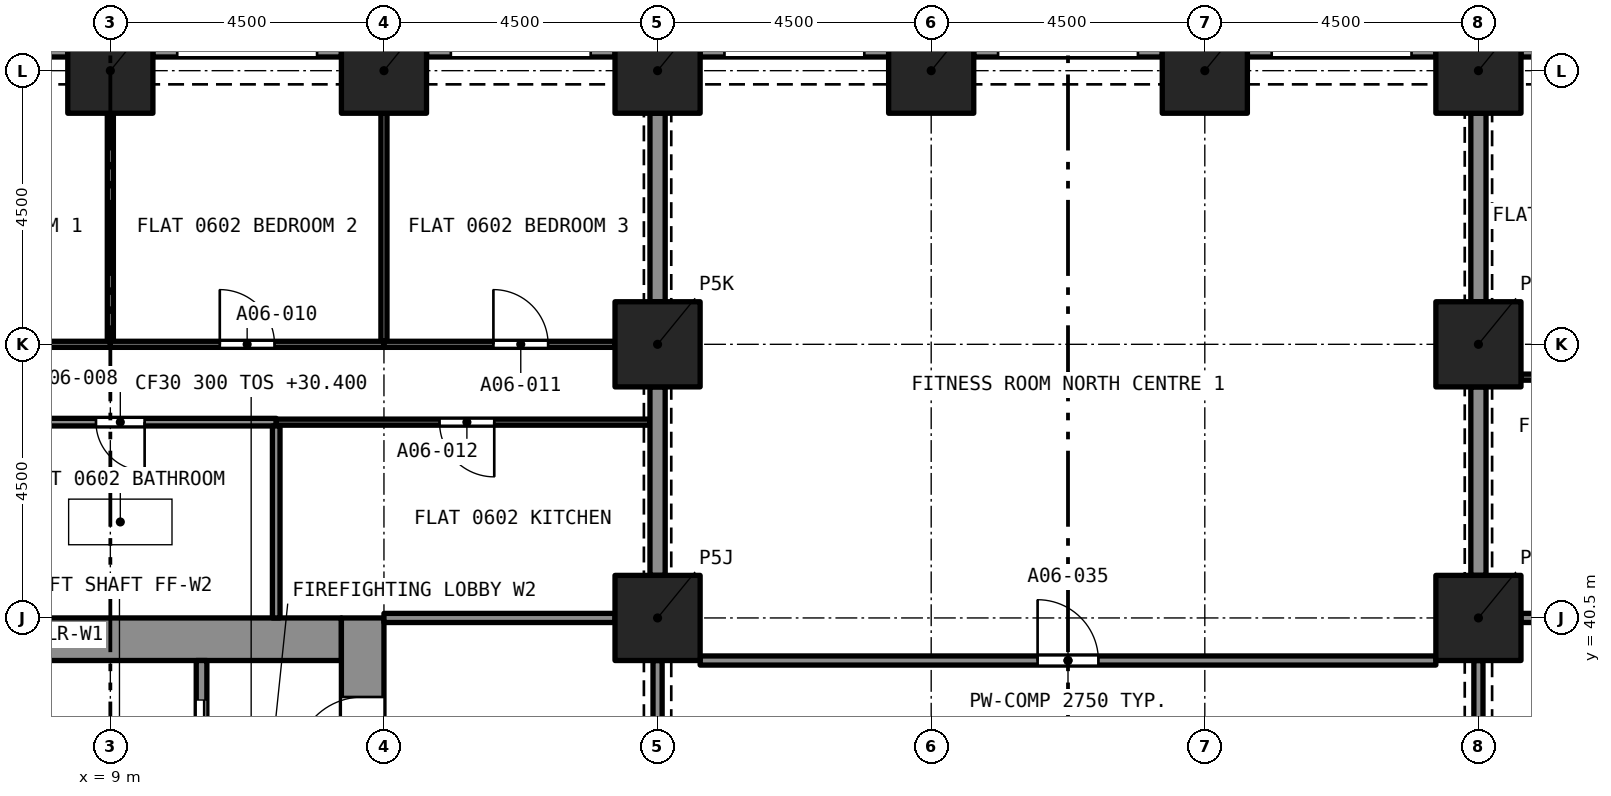
"""IFC4 building model, lengths in metres.
Left out: names, types, materials, properties, quantities, classifications, styles, units other than length and angle.
Written with IfcOpenShell. Run it as: python <this file> out.ifc"""

import sys

from ifc_helpers import new_model, si_unit, direction, frame, frame_2d, origin, origin_2d, place, context, subcontext, project, spatial, rectangle, extrude, element, fill, save


model = new_model("IFC4")
c1 = context("Model", 3, precision=1e-05, world=origin(), true_north=direction((0.0, 1.0)))
c2 = subcontext(c1, "Body", "Model", "MODEL_VIEW")
j1 = project(units=[si_unit("LENGTHUNIT", "METRE"), si_unit("PLANEANGLEUNIT", "RADIAN")], contexts=[c1])
p1 = place(None, origin())
s1 = spatial("IfcSite", under=j1, at=p1, CompositionType="ELEMENT")
p2 = place(p1, origin())
s2 = spatial("IfcBuilding", under=s1, at=p2, CompositionType="ELEMENT")
p3 = place(p2, frame((0.0, 0.0, 30.4)))
s3 = spatial("IfcBuildingStorey", under=s2, at=p3, CompositionType="ELEMENT", Elevation=30.4)
for number, where, z_axis, x_axis in (
    (1, (18.0, 40.5, 0.0), (0.0, 0.0, 1.0), (1.0, 0.0, 0.0)),
    (2, (31.5, 40.5, 0.0), (0.0, 0.0, 1.0), (1.0, 0.0, 0.0)),
    (3, (18.0, 45.0, 0.0), (0.0, 0.0, 1.0), (1.0, 0.0, 0.0)),
    (4, (31.5, 45.0, 0.0), (0.0, 0.0, 1.0), (1.0, 0.0, 0.0)),
    (5, (9.0, 49.5, 0.0), (0.0, 0.0, 1.0), (1.0, 0.0, 0.0)),
    (6, (13.5, 49.5, 0.0), (0.0, 0.0, 1.0), (1.0, 0.0, 0.0)),
    (7, (18.0, 49.5, 0.0), (0.0, 0.0, 1.0), (1.0, 0.0, 0.0)),
    (8, (22.5, 49.5, 0.0), (0.0, 0.0, 1.0), (1.0, 0.0, 0.0)),
    (9, (27.0, 49.5, 0.0), (0.0, 0.0, 1.0), (1.0, 0.0, 0.0)),
    (10, (31.5, 49.5, 0.0), (0.0, 0.0, 1.0), (1.0, 0.0, 0.0)),
):
    element("IfcColumn", number, at=place(p3, frame(where, z_axis=z_axis, x_axis=x_axis)), inside=s3, PredefinedType="COLUMN", context=c2, shape_type="SweptSolid", body=[
        extrude(rectangle(XDim=1.4, YDim=1.4, at=origin_2d()), origin(), (0.0, 0.0, 1.0), 3.2),
    ])
p4 = place(p3, frame((5.2, 40.15, 0.0), z_axis=(0.0, 0.0, 1.0), x_axis=(1.0, 0.0, 0.0)))
e11 = element("IfcWall", 11, at=p4, inside=s3, PredefinedType="SOLIDWALL", context=c2, shape_type="SweptSolid", body=[
    extrude(rectangle(XDim=7.6, YDim=0.7, at=frame_2d((3.8, 0.0))), origin(), (0.0, 0.0, 1.0), 3.2),
])
p5 = place(p3, frame((13.15, 27.0, 0.0), z_axis=(0.0, 0.0, 1.0), x_axis=(0.0, 1.0, 0.0)))
e12 = element("IfcWall", 12, at=p5, inside=s3, PredefinedType="SOLIDWALL", context=c2, shape_type="SweptSolid", body=[
    extrude(rectangle(XDim=13.5, YDim=0.7, at=frame_2d((6.75, 0.0))), origin(), (0.0, 0.0, 1.0), 3.2),
])
p6 = place(p5, frame((11.1, 0.0, 0.0)))
e13 = element("IfcOpeningElement", 13, at=p6, cuts=e12, PredefinedType="OPENING", context=c2, shape_type="SweptSolid", body=[
    extrude(rectangle(XDim=1.1, YDim=2.1, at=frame_2d((0.55, 1.05))), frame((0.0, 0.36, 0.0), z_axis=(0.0, -1.0, 0.0), x_axis=(1.0, 0.0, 0.0)), (0.0, 0.0, 1.0), 0.72),
])
p7 = place(p5, frame((8.95, 0.0, 0.0)))
e14 = element("IfcOpeningElement", 14, at=p7, cuts=e12, PredefinedType="OPENING", context=c2, shape_type="SweptSolid", body=[
    extrude(rectangle(XDim=1.2, YDim=2.1, at=frame_2d((0.6, 1.05))), frame((0.0, 0.36, 0.0), z_axis=(0.0, -1.0, 0.0), x_axis=(1.0, 0.0, 0.0)), (0.0, 0.0, 1.0), 0.72),
])
p8 = place(p3, frame((32.2, 49.875, 0.0), z_axis=(0.0, 0.0, 1.0), x_axis=(1.0, 0.0, 0.0)))
e15 = element("IfcWall", 15, at=p8, inside=s3, PredefinedType="SOLIDWALL", context=c2, shape_type="SweptSolid", body=[
    extrude(rectangle(XDim=3.1, YDim=0.3, at=frame_2d((1.55, 0.0))), origin(), (0.0, 0.0, 1.0), 3.2),
])
p9 = place(p8, frame((0.4, 0.0, 0.45)))
e16 = element("IfcOpeningElement", 16, at=p9, cuts=e15, PredefinedType="OPENING", context=c2, shape_type="SweptSolid", body=[
    extrude(rectangle(XDim=2.3, YDim=1.95, at=frame_2d((1.15, 0.975))), frame((0.0, 0.16, 0.0), z_axis=(0.0, -1.0, 0.0), x_axis=(1.0, 0.0, 0.0)), (0.0, 0.0, 1.0), 0.32),
])
p10 = place(p3, frame((27.7, 49.875, 0.0), z_axis=(0.0, 0.0, 1.0), x_axis=(1.0, 0.0, 0.0)))
e17 = element("IfcWall", 17, at=p10, inside=s3, PredefinedType="SOLIDWALL", context=c2, shape_type="SweptSolid", body=[
    extrude(rectangle(XDim=3.1, YDim=0.3, at=frame_2d((1.55, 0.0))), origin(), (0.0, 0.0, 1.0), 3.2),
])
p11 = place(p10, frame((0.4, 0.0, 0.45)))
e18 = element("IfcOpeningElement", 18, at=p11, cuts=e17, PredefinedType="OPENING", context=c2, shape_type="SweptSolid", body=[
    extrude(rectangle(XDim=2.3, YDim=1.95, at=frame_2d((1.15, 0.975))), frame((0.0, 0.16, 0.0), z_axis=(0.0, -1.0, 0.0), x_axis=(1.0, 0.0, 0.0)), (0.0, 0.0, 1.0), 0.32),
])
p12 = place(p3, frame((23.2, 49.875, 0.0), z_axis=(0.0, 0.0, 1.0), x_axis=(1.0, 0.0, 0.0)))
e19 = element("IfcWall", 19, at=p12, inside=s3, PredefinedType="SOLIDWALL", context=c2, shape_type="SweptSolid", body=[
    extrude(rectangle(XDim=3.1, YDim=0.3, at=frame_2d((1.55, 0.0))), origin(), (0.0, 0.0, 1.0), 3.2),
])
p13 = place(p12, frame((0.4, 0.0, 0.45)))
e20 = element("IfcOpeningElement", 20, at=p13, cuts=e19, PredefinedType="OPENING", context=c2, shape_type="SweptSolid", body=[
    extrude(rectangle(XDim=2.3, YDim=1.95, at=frame_2d((1.15, 0.975))), frame((0.0, 0.16, 0.0), z_axis=(0.0, -1.0, 0.0), x_axis=(1.0, 0.0, 0.0)), (0.0, 0.0, 1.0), 0.32),
])
p14 = place(p3, frame((18.7, 49.875, 0.0), z_axis=(0.0, 0.0, 1.0), x_axis=(1.0, 0.0, 0.0)))
e21 = element("IfcWall", 21, at=p14, inside=s3, PredefinedType="SOLIDWALL", context=c2, shape_type="SweptSolid", body=[
    extrude(rectangle(XDim=3.1, YDim=0.3, at=frame_2d((1.55, 0.0))), origin(), (0.0, 0.0, 1.0), 3.2),
])
p15 = place(p14, frame((0.4, 0.0, 0.45)))
e22 = element("IfcOpeningElement", 22, at=p15, cuts=e21, PredefinedType="OPENING", context=c2, shape_type="SweptSolid", body=[
    extrude(rectangle(XDim=2.3, YDim=1.95, at=frame_2d((1.15, 0.975))), frame((0.0, 0.16, 0.0), z_axis=(0.0, -1.0, 0.0), x_axis=(1.0, 0.0, 0.0)), (0.0, 0.0, 1.0), 0.32),
])
p16 = place(p3, frame((14.2, 49.875, 0.0), z_axis=(0.0, 0.0, 1.0), x_axis=(1.0, 0.0, 0.0)))
e23 = element("IfcWall", 23, at=p16, inside=s3, PredefinedType="SOLIDWALL", context=c2, shape_type="SweptSolid", body=[
    extrude(rectangle(XDim=3.1, YDim=0.3, at=frame_2d((1.55, 0.0))), origin(), (0.0, 0.0, 1.0), 3.2),
])
p17 = place(p16, frame((0.4, 0.0, 0.45)))
e24 = element("IfcOpeningElement", 24, at=p17, cuts=e23, PredefinedType="OPENING", context=c2, shape_type="SweptSolid", body=[
    extrude(rectangle(XDim=2.3, YDim=1.95, at=frame_2d((1.15, 0.975))), frame((0.0, 0.16, 0.0), z_axis=(0.0, -1.0, 0.0), x_axis=(1.0, 0.0, 0.0)), (0.0, 0.0, 1.0), 0.32),
])
p18 = place(p3, frame((9.7, 49.875, 0.0), z_axis=(0.0, 0.0, 1.0), x_axis=(1.0, 0.0, 0.0)))
e25 = element("IfcWall", 25, at=p18, inside=s3, PredefinedType="SOLIDWALL", context=c2, shape_type="SweptSolid", body=[
    extrude(rectangle(XDim=3.1, YDim=0.3, at=frame_2d((1.55, 0.0))), origin(), (0.0, 0.0, 1.0), 3.2),
])
p19 = place(p18, frame((0.4, 0.0, 0.45)))
e26 = element("IfcOpeningElement", 26, at=p19, cuts=e25, PredefinedType="OPENING", context=c2, shape_type="SweptSolid", body=[
    extrude(rectangle(XDim=2.3, YDim=1.95, at=frame_2d((1.15, 0.975))), frame((0.0, 0.16, 0.0), z_axis=(0.0, -1.0, 0.0), x_axis=(1.0, 0.0, 0.0)), (0.0, 0.0, 1.0), 0.32),
])
p20 = place(p3, frame((5.2, 49.875, 0.0), z_axis=(0.0, 0.0, 1.0), x_axis=(1.0, 0.0, 0.0)))
e27 = element("IfcWall", 27, at=p20, inside=s3, PredefinedType="SOLIDWALL", context=c2, shape_type="SweptSolid", body=[
    extrude(rectangle(XDim=3.1, YDim=0.3, at=frame_2d((1.55, 0.0))), origin(), (0.0, 0.0, 1.0), 3.2),
])
p21 = place(p20, frame((0.4, 0.0, 0.45)))
e28 = element("IfcOpeningElement", 28, at=p21, cuts=e27, PredefinedType="OPENING", context=c2, shape_type="SweptSolid", body=[
    extrude(rectangle(XDim=2.3, YDim=1.95, at=frame_2d((1.15, 0.975))), frame((0.0, 0.16, 0.0), z_axis=(0.0, -1.0, 0.0), x_axis=(1.0, 0.0, 0.0)), (0.0, 0.0, 1.0), 0.32),
])
p22 = place(p3, frame((11.728, 43.72, 0.0), z_axis=(0.0, 0.0, 1.0), x_axis=(-1.0, 0.0, 0.0)))
e29 = element("IfcWall", 29, at=p22, inside=s3, PredefinedType="PARTITIONING", context=c2, shape_type="SweptSolid", body=[
    extrude(rectangle(XDim=5.19, YDim=0.125, at=frame_2d((2.595, 0.0))), origin(), (0.0, 0.0, 1.0), 2.9),
])
p23 = place(p22, frame((2.164, 0.0, 0.0)))
e30 = element("IfcOpeningElement", 30, at=p23, cuts=e29, PredefinedType="OPENING", context=c2, shape_type="SweptSolid", body=[
    extrude(rectangle(XDim=0.8, YDim=2.1, at=frame_2d((0.4, 1.05))), frame((0.0, 0.073, 0.0), z_axis=(0.0, -1.0, 0.0), x_axis=(1.0, 0.0, 0.0)), (0.0, 0.0, 1.0), 0.145),
])
p24 = place(p3, frame((11.728, 40.5, 0.0), z_axis=(0.0, 0.0, 1.0), x_axis=(0.0, 1.0, 0.0)))
e31 = element("IfcWall", 31, at=p24, inside=s3, PredefinedType="PARTITIONING", context=c2, shape_type="SweptSolid", body=[
    extrude(rectangle(XDim=3.157, YDim=0.125, at=frame_2d((1.579, 0.0))), origin(), (0.0, 0.0, 1.0), 2.9),
])
p25 = place(p3, frame((9.0, 45.05, 0.0), z_axis=(0.0, 0.0, 1.0), x_axis=(0.0, 1.0, 0.0)))
e32 = element("IfcWall", 32, at=p25, inside=s3, PredefinedType="PARTITIONING", context=c2, shape_type="SweptSolid", body=[
    extrude(rectangle(XDim=3.75, YDim=0.1, at=frame_2d((1.875, 0.0))), origin(), (0.0, 0.0, 1.0), 2.9),
])
p26 = place(p3, frame((4.5, 45.0, 0.0), z_axis=(0.0, 0.0, 1.0), x_axis=(1.0, 0.0, 0.0)))
e33 = element("IfcWall", 33, at=p26, inside=s3, PredefinedType="PARTITIONING", context=c2, shape_type="SweptSolid", body=[
    extrude(rectangle(XDim=4.5, YDim=0.1, at=frame_2d((2.25, 0.0))), origin(), (0.0, 0.0, 1.0), 2.9),
])
p27 = place(p26, frame((1.8, 0.0, 0.0)))
e34 = element("IfcOpeningElement", 34, at=p27, cuts=e33, PredefinedType="OPENING", context=c2, shape_type="SweptSolid", body=[
    extrude(rectangle(XDim=0.9, YDim=2.1, at=frame_2d((0.45, 1.05))), frame((0.0, 0.06, 0.0), z_axis=(0.0, -1.0, 0.0), x_axis=(1.0, 0.0, 0.0)), (0.0, 0.0, 1.0), 0.12),
])
p28 = place(p3, frame((13.5, 45.05, 0.0), z_axis=(0.0, 0.0, 1.0), x_axis=(0.0, 1.0, 0.0)))
e35 = element("IfcWall", 35, at=p28, inside=s3, PredefinedType="PARTITIONING", context=c2, shape_type="SweptSolid", body=[
    extrude(rectangle(XDim=3.75, YDim=0.1, at=frame_2d((1.875, 0.0))), origin(), (0.0, 0.0, 1.0), 2.9),
])
p29 = place(p3, frame((9.0, 45.0, 0.0), z_axis=(0.0, 0.0, 1.0), x_axis=(1.0, 0.0, 0.0)))
e36 = element("IfcWall", 36, at=p29, inside=s3, PredefinedType="PARTITIONING", context=c2, shape_type="SweptSolid", body=[
    extrude(rectangle(XDim=4.5, YDim=0.1, at=frame_2d((2.25, 0.0))), origin(), (0.0, 0.0, 1.0), 2.9),
])
p30 = place(p29, frame((1.8, 0.0, 0.0)))
e37 = element("IfcOpeningElement", 37, at=p30, cuts=e36, PredefinedType="OPENING", context=c2, shape_type="SweptSolid", body=[
    extrude(rectangle(XDim=0.9, YDim=2.1, at=frame_2d((0.45, 1.05))), frame((0.0, 0.06, 0.0), z_axis=(0.0, -1.0, 0.0), x_axis=(1.0, 0.0, 0.0)), (0.0, 0.0, 1.0), 0.12),
])
p31 = place(p3, frame((13.5, 45.0, 0.0), z_axis=(0.0, 0.0, 1.0), x_axis=(1.0, 0.0, 0.0)))
e38 = element("IfcWall", 38, at=p31, inside=s3, PredefinedType="PARTITIONING", context=c2, shape_type="SweptSolid", body=[
    extrude(rectangle(XDim=3.8, YDim=0.1, at=frame_2d((1.9, 0.0))), origin(), (0.0, 0.0, 1.0), 2.9),
])
p32 = place(p31, frame((1.8, 0.0, 0.0)))
e39 = element("IfcOpeningElement", 39, at=p32, cuts=e38, PredefinedType="OPENING", context=c2, shape_type="SweptSolid", body=[
    extrude(rectangle(XDim=0.9, YDim=2.1, at=frame_2d((0.45, 1.05))), frame((0.0, 0.06, 0.0), z_axis=(0.0, -1.0, 0.0), x_axis=(1.0, 0.0, 0.0)), (0.0, 0.0, 1.0), 0.12),
])
p33 = place(p3, frame((18.0, 45.7, 0.0), z_axis=(0.0, 0.0, 1.0), x_axis=(0.0, 1.0, 0.0)))
e40 = element("IfcWall", 40, at=p33, inside=s3, PredefinedType="PARTITIONING", context=c2, shape_type="SweptSolid", body=[
    extrude(rectangle(XDim=3.1, YDim=0.25, at=frame_2d((1.55, 0.0))), origin(), (0.0, 0.0, 1.0), 2.38),
])
p34 = place(p3, frame((17.875, 43.72, 0.0), z_axis=(0.0, 0.0, 1.0), x_axis=(-1.0, 0.0, 0.0)))
e41 = element("IfcWall", 41, at=p34, inside=s3, PredefinedType="PARTITIONING", context=c2, shape_type="SweptSolid", body=[
    extrude(rectangle(XDim=6.147, YDim=0.1, at=frame_2d((3.073, 0.0))), origin(), (0.0, 0.0, 1.0), 2.9),
])
p35 = place(p34, frame((2.561, 0.0, 0.0)))
e42 = element("IfcOpeningElement", 42, at=p35, cuts=e41, PredefinedType="OPENING", context=c2, shape_type="SweptSolid", body=[
    extrude(rectangle(XDim=0.9, YDim=2.1, at=frame_2d((0.45, 1.05))), frame((0.0, 0.06, 0.0), z_axis=(0.0, -1.0, 0.0), x_axis=(1.0, 0.0, 0.0)), (0.0, 0.0, 1.0), 0.12),
])
p36 = place(p3, frame((18.0, 41.2, 0.0), z_axis=(0.0, 0.0, 1.0), x_axis=(0.0, 1.0, 0.0)))
e43 = element("IfcWall", 43, at=p36, inside=s3, PredefinedType="PARTITIONING", context=c2, shape_type="SweptSolid", body=[
    extrude(rectangle(XDim=3.1, YDim=0.25, at=frame_2d((1.55, 0.0))), origin(), (0.0, 0.0, 1.0), 2.38),
])
p37 = place(p3, frame((13.5, 40.5, 0.0), z_axis=(0.0, 0.0, 1.0), x_axis=(1.0, 0.0, 0.0)))
e44 = element("IfcWall", 44, at=p37, inside=s3, PredefinedType="PARTITIONING", context=c2, shape_type="SweptSolid", body=[
    extrude(rectangle(XDim=3.8, YDim=0.15, at=frame_2d((1.9, 0.0))), origin(), (0.0, 0.0, 1.0), 2.9),
])
p38 = place(p3, frame((32.2, 44.46, 0.0), z_axis=(0.0, 0.0, 1.0), x_axis=(1.0, 0.0, 0.0)))
e45 = element("IfcWall", 45, at=p38, inside=s3, PredefinedType="PARTITIONING", context=c2, shape_type="SweptSolid", body=[
    extrude(rectangle(XDim=3.8, YDim=0.1, at=frame_2d((1.9, 0.0))), origin(), (0.0, 0.0, 1.0), 2.9),
])
p39 = place(p38, frame((1.05, 0.0, 0.0)))
e46 = element("IfcOpeningElement", 46, at=p39, cuts=e45, PredefinedType="OPENING", context=c2, shape_type="SweptSolid", body=[
    extrude(rectangle(XDim=1.0, YDim=2.1, at=frame_2d((0.5, 1.05))), frame((0.0, 0.06, 0.0), z_axis=(0.0, -1.0, 0.0), x_axis=(1.0, 0.0, 0.0)), (0.0, 0.0, 1.0), 0.12),
])
p40 = place(p3, frame((31.5, 41.2, 0.0), z_axis=(0.0, 0.0, 1.0), x_axis=(0.0, 1.0, 0.0)))
e47 = element("IfcWall", 47, at=p40, inside=s3, PredefinedType="PARTITIONING", context=c2, shape_type="SweptSolid", body=[
    extrude(rectangle(XDim=3.1, YDim=0.25, at=frame_2d((1.55, 0.0))), origin(), (0.0, 0.0, 1.0), 2.38),
])
p41 = place(p3, frame((32.2, 40.5, 0.0), z_axis=(0.0, 0.0, 1.0), x_axis=(1.0, 0.0, 0.0)))
e48 = element("IfcWall", 48, at=p41, inside=s3, PredefinedType="PARTITIONING", context=c2, shape_type="SweptSolid", body=[
    extrude(rectangle(XDim=2.225, YDim=0.15, at=frame_2d((1.113, 0.0))), origin(), (0.0, 0.0, 1.0), 2.9),
])
p42 = place(p41, frame((1.05, 0.0, 0.0)))
e49 = element("IfcOpeningElement", 49, at=p42, cuts=e48, PredefinedType="OPENING", context=c2, shape_type="SweptSolid", body=[
    extrude(rectangle(XDim=1.0, YDim=2.1, at=frame_2d((0.5, 1.05))), frame((0.0, 0.085, 0.0), z_axis=(0.0, -1.0, 0.0), x_axis=(1.0, 0.0, 0.0)), (0.0, 0.0, 1.0), 0.17),
])
p43 = place(p3, frame((31.5, 45.7, 0.0), z_axis=(0.0, 0.0, 1.0), x_axis=(0.0, 1.0, 0.0)))
e50 = element("IfcWall", 50, at=p43, inside=s3, PredefinedType="PARTITIONING", context=c2, shape_type="SweptSolid", body=[
    extrude(rectangle(XDim=3.1, YDim=0.25, at=frame_2d((1.55, 0.0))), origin(), (0.0, 0.0, 1.0), 2.38),
])
p44 = place(p3, frame((18.7, 39.8, 0.0), z_axis=(0.0, 0.0, 1.0), x_axis=(1.0, 0.0, 0.0)))
e51 = element("IfcWall", 51, at=p44, inside=s3, PredefinedType="PARTITIONING", context=c2, shape_type="SweptSolid", body=[
    extrude(rectangle(XDim=12.1, YDim=0.15, at=frame_2d((6.05, 0.0))), origin(), (0.0, 0.0, 1.0), 2.75),
])
p45 = place(p44, frame((5.55, 0.0, 0.0)))
e52 = element("IfcOpeningElement", 52, at=p45, cuts=e51, PredefinedType="OPENING", context=c2, shape_type="SweptSolid", body=[
    extrude(rectangle(XDim=1.0, YDim=2.1, at=frame_2d((0.5, 1.05))), frame((0.0, 0.085, 0.0), z_axis=(0.0, -1.0, 0.0), x_axis=(1.0, 0.0, 0.0)), (0.0, 0.0, 1.0), 0.17),
])
p46 = place(p3, frame((31.5, 36.7, 0.0), z_axis=(0.0, 0.0, 1.0), x_axis=(0.0, 1.0, 0.0)))
e53 = element("IfcWall", 53, at=p46, inside=s3, PredefinedType="PARTITIONING", context=c2, shape_type="SweptSolid", body=[
    extrude(rectangle(XDim=3.1, YDim=0.15, at=frame_2d((1.55, 0.0))), origin(), (0.0, 0.0, 1.0), 2.38),
])
p47 = place(p46, frame((0.95, 0.0, 0.0)))
e54 = element("IfcOpeningElement", 54, at=p47, cuts=e53, PredefinedType="OPENING", context=c2, shape_type="SweptSolid", body=[
    extrude(rectangle(XDim=1.2, YDim=2.1, at=frame_2d((0.6, 1.05))), frame((0.0, 0.085, 0.0), z_axis=(0.0, -1.0, 0.0), x_axis=(1.0, 0.0, 0.0)), (0.0, 0.0, 1.0), 0.17),
])
p48 = place(p3, frame((18.0, 39.8, 0.0), z_axis=(0.0, 0.0, 1.0), x_axis=(0.0, -1.0, 0.0)))
e55 = element("IfcWall", 55, at=p48, inside=s3, PredefinedType="PARTITIONING", context=c2, shape_type="SweptSolid", body=[
    extrude(rectangle(XDim=3.1, YDim=0.15, at=frame_2d((1.55, 0.0))), origin(), (0.0, 0.0, 1.0), 2.38),
])
p49 = place(p48, frame((0.95, 0.0, 0.0)))
e56 = element("IfcOpeningElement", 56, at=p49, cuts=e55, PredefinedType="OPENING", context=c2, shape_type="SweptSolid", body=[
    extrude(rectangle(XDim=1.2, YDim=2.1, at=frame_2d((0.6, 1.05))), frame((0.0, 0.085, 0.0), z_axis=(0.0, -1.0, 0.0), x_axis=(1.0, 0.0, 0.0)), (0.0, 0.0, 1.0), 0.17),
])
p50 = place(p3, frame((10.5, 37.5, 0.0), z_axis=(0.0, 0.0, 1.0), x_axis=(0.0, 1.0, 0.0)))
e57 = element("IfcWall", 57, at=p50, inside=s3, PredefinedType="SOLIDWALL", context=c2, shape_type="SweptSolid", body=[
    extrude(rectangle(XDim=2.3, YDim=0.175, at=frame_2d((1.15, 0.0))), origin(), (0.0, 0.0, 1.0), 2.9),
])
p51 = place(p50, frame((0.65, 0.0, 0.0)))
e58 = element("IfcOpeningElement", 58, at=p51, cuts=e57, PredefinedType="OPENING", context=c2, shape_type="SweptSolid", body=[
    extrude(rectangle(XDim=1.0, YDim=2.1, at=frame_2d((0.5, 1.05))), frame((0.0, 0.097, 0.0), z_axis=(0.0, -1.0, 0.0), x_axis=(1.0, 0.0, 0.0)), (0.0, 0.0, 1.0), 0.195),
])
p52 = place(p23, origin())
e59 = element("IfcDoor", 59, at=p52, inside=s3, OperationType="SINGLE_SWING_LEFT", PredefinedType="DOOR", context=c2, shape_type="SweptSolid", body=[
    extrude(rectangle(XDim=0.8, YDim=2.1, at=frame_2d((0.4, 1.05))), frame((0.0, 0.025, 0.0), z_axis=(0.0, -1.0, 0.0), x_axis=(1.0, 0.0, 0.0)), (0.0, 0.0, 1.0), 0.05),
])
fill(e30, e59)
p53 = place(p30, origin())
e60 = element("IfcDoor", 60, at=p53, inside=s3, OperationType="SINGLE_SWING_LEFT", PredefinedType="DOOR", context=c2, shape_type="SweptSolid", body=[
    extrude(rectangle(XDim=0.9, YDim=2.1, at=frame_2d((0.45, 1.05))), frame((0.0, 0.025, 0.0), z_axis=(0.0, -1.0, 0.0), x_axis=(1.0, 0.0, 0.0)), (0.0, 0.0, 1.0), 0.05),
])
fill(e37, e60)
p54 = place(p32, origin())
e61 = element("IfcDoor", 61, at=p54, inside=s3, OperationType="SINGLE_SWING_RIGHT", PredefinedType="DOOR", context=c2, shape_type="SweptSolid", body=[
    extrude(rectangle(XDim=0.9, YDim=2.1, at=frame_2d((0.45, 1.05))), frame((0.0, 0.025, 0.0), z_axis=(0.0, -1.0, 0.0), x_axis=(1.0, 0.0, 0.0)), (0.0, 0.0, 1.0), 0.05),
])
fill(e39, e61)
p55 = place(p35, origin())
e62 = element("IfcDoor", 62, at=p55, inside=s3, OperationType="SINGLE_SWING_LEFT", PredefinedType="DOOR", context=c2, shape_type="SweptSolid", body=[
    extrude(rectangle(XDim=0.9, YDim=2.1, at=frame_2d((0.45, 1.05))), frame((0.0, 0.025, 0.0), z_axis=(0.0, -1.0, 0.0), x_axis=(1.0, 0.0, 0.0)), (0.0, 0.0, 1.0), 0.05),
])
fill(e42, e62)
p56 = place(p45, origin())
e63 = element("IfcDoor", 63, at=p56, inside=s3, OperationType="SINGLE_SWING_RIGHT", PredefinedType="DOOR", context=c2, shape_type="SweptSolid", body=[
    extrude(rectangle(XDim=1.0, YDim=2.1, at=frame_2d((0.5, 1.05))), frame((0.0, 0.025, 0.0), z_axis=(0.0, -1.0, 0.0), x_axis=(1.0, 0.0, 0.0)), (0.0, 0.0, 1.0), 0.05),
])
fill(e52, e63)
p57 = place(p51, origin())
e64 = element("IfcDoor", 64, at=p57, inside=s3, OperationType="SLIDING_TO_LEFT", PredefinedType="DOOR", context=c2, shape_type="SweptSolid", body=[
    extrude(rectangle(XDim=1.0, YDim=2.1, at=frame_2d((0.5, 1.05))), frame((0.0, 0.025, 0.0), z_axis=(0.0, -1.0, 0.0), x_axis=(1.0, 0.0, 0.0)), (0.0, 0.0, 1.0), 0.05),
])
fill(e58, e64)
p58 = place(p6, origin())
e65 = element("IfcDoor", 65, at=p58, inside=s3, OperationType="SINGLE_SWING_LEFT", PredefinedType="DOOR", context=c2, shape_type="SweptSolid", body=[
    extrude(rectangle(XDim=1.1, YDim=2.1, at=frame_2d((0.55, 1.05))), frame((0.0, 0.025, 0.0), z_axis=(0.0, -1.0, 0.0), x_axis=(1.0, 0.0, 0.0)), (0.0, 0.0, 1.0), 0.05),
])
fill(e13, e65)
save(model, sys.argv[1])
